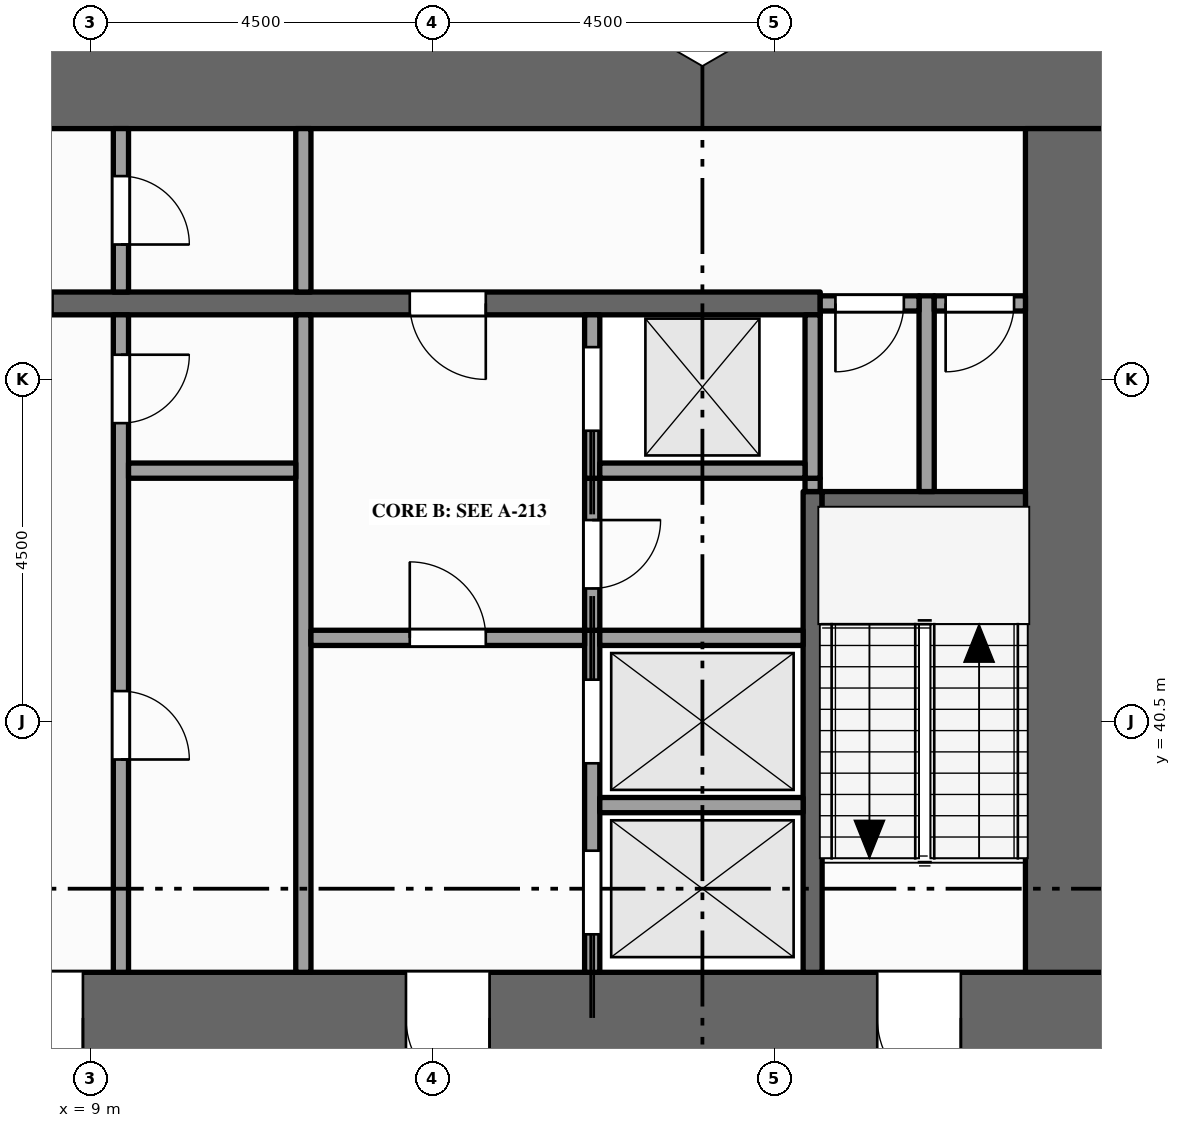
"""IFC4 building model, lengths in metres.
Left out: names, types, materials, properties, quantities, classifications, styles, units other than length and angle.
Written with IfcOpenShell. Run it as: python <this file> out.ifc"""

import sys

from ifc_helpers import new_model, si_unit, direction, frame, frame_2d, origin, place, context, subcontext, project, spatial, rectangle, extrude, element, fill, save


model = new_model("IFC4")
c1 = context("Model", 3, precision=1e-05, world=origin(), true_north=direction((0.0, 1.0)))
c2 = subcontext(c1, "Body", "Model", "MODEL_VIEW")
j1 = project(units=[si_unit("LENGTHUNIT", "METRE"), si_unit("PLANEANGLEUNIT", "RADIAN")], contexts=[c1])
p1 = place(None, origin())
s1 = spatial("IfcSite", under=j1, at=p1, CompositionType="ELEMENT")
p2 = place(p1, origin())
s2 = spatial("IfcBuilding", under=s1, at=p2, CompositionType="ELEMENT")
p3 = place(p2, frame((0.0, 0.0, 69.0)))
s3 = spatial("IfcBuildingStorey", under=s2, at=p3, CompositionType="ELEMENT", Elevation=69.0)
p4 = place(p3, frame((0.0, 36.6, -0.15), z_axis=(0.0, 0.0, 1.0), x_axis=(1.0, 0.0, 0.0)))
e1 = element("IfcWall", 1, at=p4, inside=s3, PredefinedType="SHEAR", context=c2, shape_type="SweptSolid", body=[
    extrude(rectangle(XDim=22.5, YDim=1.2, at=frame_2d((11.25, 0.0))), origin(), (0.0, 0.0, 1.0), 4.0),
])
p5 = place(p4, frame((7.1, 0.0, 0.15)))
e2 = element("IfcOpeningElement", 2, at=p5, cuts=e1, PredefinedType="OPENING", context=c2, shape_type="SweptSolid", body=[
    extrude(rectangle(XDim=1.8, YDim=2.1, at=frame_2d((0.9, 1.05))), frame((0.0, 0.61, 0.0), z_axis=(0.0, -1.0, 0.0), x_axis=(1.0, 0.0, 0.0)), (0.0, 0.0, 1.0), 1.22),
])
p6 = place(p4, frame((13.15, 0.0, 0.15)))
e3 = element("IfcOpeningElement", 3, at=p6, cuts=e1, PredefinedType="OPENING", context=c2, shape_type="SweptSolid", body=[
    extrude(rectangle(XDim=1.1, YDim=2.1, at=frame_2d((0.55, 1.05))), frame((0.0, 0.61, 0.0), z_axis=(0.0, -1.0, 0.0), x_axis=(1.0, 0.0, 0.0)), (0.0, 0.0, 1.0), 1.22),
])
p7 = place(p4, frame((2.15, 0.0, 0.15)))
e4 = element("IfcOpeningElement", 4, at=p7, cuts=e1, PredefinedType="OPENING", context=c2, shape_type="SweptSolid", body=[
    extrude(rectangle(XDim=1.1, YDim=2.1, at=frame_2d((0.55, 1.05))), frame((0.0, 0.61, 0.0), z_axis=(0.0, -1.0, 0.0), x_axis=(1.0, 0.0, 0.0)), (0.0, 0.0, 1.0), 1.22),
])
p8 = place(p4, frame((19.35, 0.0, 0.15)))
e5 = element("IfcOpeningElement", 5, at=p8, cuts=e1, PredefinedType="OPENING", context=c2, shape_type="SweptSolid", body=[
    extrude(rectangle(XDim=1.1, YDim=2.1, at=frame_2d((0.55, 1.05))), frame((0.0, 0.61, 0.0), z_axis=(0.0, -1.0, 0.0), x_axis=(1.0, 0.0, 0.0)), (0.0, 0.0, 1.0), 1.22),
])
p9 = place(p3, frame((0.0, 48.9, -0.15), z_axis=(0.0, 0.0, 1.0), x_axis=(1.0, 0.0, 0.0)))
e6 = element("IfcWall", 6, at=p9, inside=s3, PredefinedType="SHEAR", context=c2, shape_type="SweptSolid", body=[
    extrude(rectangle(XDim=22.5, YDim=1.2, at=frame_2d((11.25, 0.0))), origin(), (0.0, 0.0, 1.0), 4.0),
])
p10 = place(p3, frame((21.9, 37.2, -0.15), z_axis=(0.0, 0.0, 1.0), x_axis=(0.0, 1.0, 0.0)))
e7 = element("IfcWall", 7, at=p10, inside=s3, PredefinedType="SHEAR", context=c2, shape_type="SweptSolid", body=[
    extrude(rectangle(XDim=11.1, YDim=1.2, at=frame_2d((5.55, 0.0))), origin(), (0.0, 0.0, 1.0), 4.0),
])
p11 = place(p3, frame((9.4, 37.2, 0.0), z_axis=(0.0, 0.0, 1.0), x_axis=(0.0, 1.0, 0.0)))
e8 = element("IfcWall", 8, at=p11, inside=s3, PredefinedType="PARTITIONING", context=c2, shape_type="SweptSolid", body=[
    extrude(rectangle(XDim=8.65, YDim=0.2, at=frame_2d((4.325, 0.0))), origin(), (0.0, 0.0, 1.0), 3.85),
])
p12 = place(p11, frame((2.8, 0.0, 0.0)))
e9 = element("IfcOpeningElement", 9, at=p12, cuts=e8, PredefinedType="OPENING", context=c2, shape_type="SweptSolid", body=[
    extrude(rectangle(XDim=0.9, YDim=2.1, at=frame_2d((0.45, 1.05))), frame((0.0, 0.11, 0.0), z_axis=(0.0, -1.0, 0.0), x_axis=(1.0, 0.0, 0.0)), (0.0, 0.0, 1.0), 0.22),
])
p13 = place(p11, frame((7.225, 0.0, 0.0)))
e10 = element("IfcOpeningElement", 10, at=p13, cuts=e8, PredefinedType="OPENING", context=c2, shape_type="SweptSolid", body=[
    extrude(rectangle(XDim=0.9, YDim=2.1, at=frame_2d((0.45, 1.05))), frame((0.0, 0.11, 0.0), z_axis=(0.0, -1.0, 0.0), x_axis=(1.0, 0.0, 0.0)), (0.0, 0.0, 1.0), 0.22),
])
p14 = place(p3, frame((9.4, 46.15, 0.0), z_axis=(0.0, 0.0, 1.0), x_axis=(0.0, 1.0, 0.0)))
e11 = element("IfcWall", 11, at=p14, inside=s3, PredefinedType="PARTITIONING", context=c2, shape_type="SweptSolid", body=[
    extrude(rectangle(XDim=2.15, YDim=0.2, at=frame_2d((1.075, 0.0))), origin(), (0.0, 0.0, 1.0), 3.85),
])
p15 = place(p14, frame((0.625, 0.0, 0.0)))
e12 = element("IfcOpeningElement", 12, at=p15, cuts=e11, PredefinedType="OPENING", context=c2, shape_type="SweptSolid", body=[
    extrude(rectangle(XDim=0.9, YDim=2.1, at=frame_2d((0.45, 1.05))), frame((0.0, 0.11, 0.0), z_axis=(0.0, -1.0, 0.0), x_axis=(1.0, 0.0, 0.0)), (0.0, 0.0, 1.0), 0.22),
])
p16 = place(p3, frame((11.8, 37.2, 0.0), z_axis=(0.0, 0.0, 1.0), x_axis=(0.0, 1.0, 0.0)))
e13 = element("IfcWall", 13, at=p16, inside=s3, PredefinedType="PARTITIONING", context=c2, shape_type="SweptSolid", body=[
    extrude(rectangle(XDim=8.65, YDim=0.2, at=frame_2d((4.325, 0.0))), origin(), (0.0, 0.0, 1.0), 3.85),
])
p17 = place(p3, frame((11.8, 46.15, 0.0), z_axis=(0.0, 0.0, 1.0), x_axis=(0.0, 1.0, 0.0)))
e14 = element("IfcWall", 14, at=p17, inside=s3, PredefinedType="PARTITIONING", context=c2, shape_type="SweptSolid", body=[
    extrude(rectangle(XDim=2.15, YDim=0.2, at=frame_2d((1.075, 0.0))), origin(), (0.0, 0.0, 1.0), 3.85),
])
p18 = place(p3, frame((15.6, 37.2, 0.0), z_axis=(0.0, 0.0, 1.0), x_axis=(0.0, 1.0, 0.0)))
e15 = element("IfcWall", 15, at=p18, inside=s3, PredefinedType="SOLIDWALL", context=c2, shape_type="SweptSolid", body=[
    extrude(rectangle(XDim=4.5, YDim=0.2, at=frame_2d((2.25, 0.0))), origin(), (0.0, 0.0, 1.0), 3.85),
])
p19 = place(p18, frame((0.5, 0.0, 0.012)))
e16 = element("IfcOpeningElement", 16, at=p19, cuts=e15, PredefinedType="OPENING", context=c2, shape_type="SweptSolid", body=[
    extrude(rectangle(XDim=1.1, YDim=2.1, at=frame_2d((0.55, 1.05))), frame((0.0, 0.11, 0.0), z_axis=(0.0, -1.0, 0.0), x_axis=(1.0, 0.0, 0.0)), (0.0, 0.0, 1.0), 0.22),
])
p20 = place(p18, frame((2.75, 0.0, 0.012)))
e17 = element("IfcOpeningElement", 17, at=p20, cuts=e15, PredefinedType="OPENING", context=c2, shape_type="SweptSolid", body=[
    extrude(rectangle(XDim=1.1, YDim=2.1, at=frame_2d((0.55, 1.05))), frame((0.0, 0.11, 0.0), z_axis=(0.0, -1.0, 0.0), x_axis=(1.0, 0.0, 0.0)), (0.0, 0.0, 1.0), 0.22),
])
p21 = place(p3, frame((15.6, 41.7, 0.0), z_axis=(0.0, 0.0, 1.0), x_axis=(0.0, 1.0, 0.0)))
e18 = element("IfcWall", 18, at=p21, inside=s3, PredefinedType="PARTITIONING", context=c2, shape_type="SweptSolid", body=[
    extrude(rectangle(XDim=2.0, YDim=0.2, at=frame_2d((1.0, 0.0))), origin(), (0.0, 0.0, 1.0), 3.85),
])
p22 = place(p21, frame((0.55, 0.0, 0.0)))
e19 = element("IfcOpeningElement", 19, at=p22, cuts=e18, PredefinedType="OPENING", context=c2, shape_type="SweptSolid", body=[
    extrude(rectangle(XDim=0.9, YDim=2.1, at=frame_2d((0.45, 1.05))), frame((0.0, 0.11, 0.0), z_axis=(0.0, -1.0, 0.0), x_axis=(1.0, 0.0, 0.0)), (0.0, 0.0, 1.0), 0.22),
])
p23 = place(p3, frame((15.6, 43.7, 0.0), z_axis=(0.0, 0.0, 1.0), x_axis=(0.0, 1.0, 0.0)))
e20 = element("IfcWall", 20, at=p23, inside=s3, PredefinedType="SOLIDWALL", context=c2, shape_type="SweptSolid", body=[
    extrude(rectangle(XDim=2.15, YDim=0.2, at=frame_2d((1.075, 0.0))), origin(), (0.0, 0.0, 1.0), 3.85),
])
p24 = place(p23, frame((0.625, 0.0, 0.012)))
e21 = element("IfcOpeningElement", 21, at=p24, cuts=e20, PredefinedType="OPENING", context=c2, shape_type="SweptSolid", body=[
    extrude(rectangle(XDim=1.1, YDim=2.1, at=frame_2d((0.55, 1.05))), frame((0.0, 0.11, 0.0), z_axis=(0.0, -1.0, 0.0), x_axis=(1.0, 0.0, 0.0)), (0.0, 0.0, 1.0), 0.22),
])
p25 = place(p3, frame((18.5, 37.2, 0.0), z_axis=(0.0, 0.0, 1.0), x_axis=(0.0, 1.0, 0.0)))
e22 = element("IfcWall", 22, at=p25, inside=s3, PredefinedType="SHEAR", context=c2, shape_type="SweptSolid", body=[
    extrude(rectangle(XDim=6.325, YDim=0.25, at=frame_2d((3.163, 0.0))), origin(), (0.0, 0.0, 1.0), 3.85),
])
p26 = place(p3, frame((18.5, 43.525, 0.0), z_axis=(0.0, 0.0, 1.0), x_axis=(0.0, 1.0, 0.0)))
e23 = element("IfcWall", 23, at=p26, inside=s3, PredefinedType="PARTITIONING", context=c2, shape_type="SweptSolid", body=[
    extrude(rectangle(XDim=0.175, YDim=0.2, at=frame_2d((0.087, 0.0))), origin(), (0.0, 0.0, 1.0), 3.85),
])
p27 = place(p3, frame((18.5, 43.7, 0.0), z_axis=(0.0, 0.0, 1.0), x_axis=(0.0, 1.0, 0.0)))
e24 = element("IfcWall", 24, at=p27, inside=s3, PredefinedType="SOLIDWALL", context=c2, shape_type="SweptSolid", body=[
    extrude(rectangle(XDim=2.15, YDim=0.2, at=frame_2d((1.075, 0.0))), origin(), (0.0, 0.0, 1.0), 3.85),
])
p28 = place(p3, frame((20.0, 43.525, 0.0), z_axis=(0.0, 0.0, 1.0), x_axis=(0.0, 1.0, 0.0)))
e25 = element("IfcWall", 25, at=p28, inside=s3, PredefinedType="PARTITIONING", context=c2, shape_type="SweptSolid", body=[
    extrude(rectangle(XDim=2.575, YDim=0.2, at=frame_2d((1.288, 0.0))), origin(), (0.0, 0.0, 1.0), 3.85),
])
p29 = place(p3, frame((15.7, 39.4, 0.0), z_axis=(0.0, 0.0, 1.0), x_axis=(1.0, 0.0, 0.0)))
e26 = element("IfcWall", 26, at=p29, inside=s3, PredefinedType="SOLIDWALL", context=c2, shape_type="SweptSolid", body=[
    extrude(rectangle(XDim=2.675, YDim=0.2, at=frame_2d((1.337, 0.0))), origin(), (0.0, 0.0, 1.0), 3.85),
])
p30 = place(p3, frame((11.9, 41.6, 0.0), z_axis=(0.0, 0.0, 1.0), x_axis=(1.0, 0.0, 0.0)))
e27 = element("IfcWall", 27, at=p30, inside=s3, PredefinedType="PARTITIONING", context=c2, shape_type="SweptSolid", body=[
    extrude(rectangle(XDim=3.6, YDim=0.2, at=frame_2d((1.8, 0.0))), origin(), (0.0, 0.0, 1.0), 3.85),
])
p31 = place(p30, frame((1.3, 0.0, 0.0)))
e28 = element("IfcOpeningElement", 28, at=p31, cuts=e27, PredefinedType="OPENING", context=c2, shape_type="SweptSolid", body=[
    extrude(rectangle(XDim=1.0, YDim=2.1, at=frame_2d((0.5, 1.05))), frame((0.0, 0.11, 0.0), z_axis=(0.0, -1.0, 0.0), x_axis=(1.0, 0.0, 0.0)), (0.0, 0.0, 1.0), 0.22),
])
p32 = place(p3, frame((15.7, 41.6, 0.0), z_axis=(0.0, 0.0, 1.0), x_axis=(1.0, 0.0, 0.0)))
e29 = element("IfcWall", 29, at=p32, inside=s3, PredefinedType="SOLIDWALL", context=c2, shape_type="SweptSolid", body=[
    extrude(rectangle(XDim=2.675, YDim=0.2, at=frame_2d((1.337, 0.0))), origin(), (0.0, 0.0, 1.0), 3.85),
])
p33 = place(p3, frame((18.625, 43.4, 0.0), z_axis=(0.0, 0.0, 1.0), x_axis=(1.0, 0.0, 0.0)))
e30 = element("IfcWall", 30, at=p33, inside=s3, PredefinedType="SHEAR", context=c2, shape_type="SweptSolid", body=[
    extrude(rectangle(XDim=2.675, YDim=0.25, at=frame_2d((1.337, 0.0))), origin(), (0.0, 0.0, 1.0), 3.85),
])
p34 = place(p3, frame((9.5, 43.8, 0.0), z_axis=(0.0, 0.0, 1.0), x_axis=(1.0, 0.0, 0.0)))
e31 = element("IfcWall", 31, at=p34, inside=s3, PredefinedType="PARTITIONING", context=c2, shape_type="SweptSolid", body=[
    extrude(rectangle(XDim=2.2, YDim=0.2, at=frame_2d((1.1, 0.0))), origin(), (0.0, 0.0, 1.0), 3.85),
])
p35 = place(p3, frame((15.7, 43.8, 0.0), z_axis=(0.0, 0.0, 1.0), x_axis=(1.0, 0.0, 0.0)))
e32 = element("IfcWall", 32, at=p35, inside=s3, PredefinedType="SOLIDWALL", context=c2, shape_type="SweptSolid", body=[
    extrude(rectangle(XDim=2.7, YDim=0.2, at=frame_2d((1.35, 0.0))), origin(), (0.0, 0.0, 1.0), 3.85),
])
p36 = place(p3, frame((4.1, 46.0, 0.0), z_axis=(0.0, 0.0, 1.0), x_axis=(1.0, 0.0, 0.0)))
e33 = element("IfcWall", 33, at=p36, inside=s3, PredefinedType="SHEAR", context=c2, shape_type="SweptSolid", body=[
    extrude(rectangle(XDim=14.5, YDim=0.3, at=frame_2d((7.25, 0.0))), origin(), (0.0, 0.0, 1.0), 3.85),
])
p37 = place(p36, frame((3.4, 0.0, 0.0)))
e34 = element("IfcOpeningElement", 34, at=p37, cuts=e33, PredefinedType="OPENING", context=c2, shape_type="SweptSolid", body=[
    extrude(rectangle(XDim=1.0, YDim=2.1, at=frame_2d((0.5, 1.05))), frame((0.0, 0.16, 0.0), z_axis=(0.0, -1.0, 0.0), x_axis=(1.0, 0.0, 0.0)), (0.0, 0.0, 1.0), 0.32),
])
p38 = place(p36, frame((9.1, 0.0, 0.0)))
e35 = element("IfcOpeningElement", 35, at=p38, cuts=e33, PredefinedType="OPENING", context=c2, shape_type="SweptSolid", body=[
    extrude(rectangle(XDim=1.0, YDim=2.1, at=frame_2d((0.5, 1.05))), frame((0.0, 0.16, 0.0), z_axis=(0.0, -1.0, 0.0), x_axis=(1.0, 0.0, 0.0)), (0.0, 0.0, 1.0), 0.32),
])
p39 = place(p3, frame((18.6, 46.0, 0.0), z_axis=(0.0, 0.0, 1.0), x_axis=(1.0, 0.0, 0.0)))
e36 = element("IfcWall", 36, at=p39, inside=s3, PredefinedType="PARTITIONING", context=c2, shape_type="SweptSolid", body=[
    extrude(rectangle(XDim=1.3, YDim=0.2, at=frame_2d((0.65, 0.0))), origin(), (0.0, 0.0, 1.0), 3.85),
])
p40 = place(p39, frame((0.2, 0.0, 0.0)))
e37 = element("IfcOpeningElement", 37, at=p40, cuts=e36, PredefinedType="OPENING", context=c2, shape_type="SweptSolid", body=[
    extrude(rectangle(XDim=0.9, YDim=2.1, at=frame_2d((0.45, 1.05))), frame((0.0, 0.11, 0.0), z_axis=(0.0, -1.0, 0.0), x_axis=(1.0, 0.0, 0.0)), (0.0, 0.0, 1.0), 0.22),
])
p41 = place(p3, frame((20.1, 46.0, 0.0), z_axis=(0.0, 0.0, 1.0), x_axis=(1.0, 0.0, 0.0)))
e38 = element("IfcWall", 38, at=p41, inside=s3, PredefinedType="PARTITIONING", context=c2, shape_type="SweptSolid", body=[
    extrude(rectangle(XDim=1.2, YDim=0.2, at=frame_2d((0.6, 0.0))), origin(), (0.0, 0.0, 1.0), 3.85),
])
p42 = place(p41, frame((0.15, 0.0, 0.0)))
e39 = element("IfcOpeningElement", 39, at=p42, cuts=e38, PredefinedType="OPENING", context=c2, shape_type="SweptSolid", body=[
    extrude(rectangle(XDim=0.9, YDim=2.1, at=frame_2d((0.45, 1.05))), frame((0.0, 0.11, 0.0), z_axis=(0.0, -1.0, 0.0), x_axis=(1.0, 0.0, 0.0)), (0.0, 0.0, 1.0), 0.22),
])
p43 = place(p19, origin())
e40 = element("IfcDoor", 40, at=p43, inside=s3, OperationType="SLIDING_TO_LEFT", PredefinedType="DOOR", context=c2, shape_type="SweptSolid", body=[
    extrude(rectangle(XDim=1.1, YDim=2.1, at=frame_2d((0.55, 1.05))), frame((0.0, 0.025, 0.0), z_axis=(0.0, -1.0, 0.0), x_axis=(1.0, 0.0, 0.0)), (0.0, 0.0, 1.0), 0.05),
])
fill(e16, e40)
p44 = place(p20, origin())
e41 = element("IfcDoor", 41, at=p44, inside=s3, OperationType="SLIDING_TO_RIGHT", PredefinedType="DOOR", context=c2, shape_type="SweptSolid", body=[
    extrude(rectangle(XDim=1.1, YDim=2.1, at=frame_2d((0.55, 1.05))), frame((0.0, 0.025, 0.0), z_axis=(0.0, -1.0, 0.0), x_axis=(1.0, 0.0, 0.0)), (0.0, 0.0, 1.0), 0.05),
])
fill(e17, e41)
p45 = place(p24, origin())
e42 = element("IfcDoor", 42, at=p45, inside=s3, OperationType="SLIDING_TO_LEFT", PredefinedType="DOOR", context=c2, shape_type="SweptSolid", body=[
    extrude(rectangle(XDim=1.1, YDim=2.1, at=frame_2d((0.55, 1.05))), frame((0.0, 0.025, 0.0), z_axis=(0.0, -1.0, 0.0), x_axis=(1.0, 0.0, 0.0)), (0.0, 0.0, 1.0), 0.05),
])
fill(e21, e42)
p46 = place(p5, origin())
e43 = element("IfcDoor", 43, at=p46, inside=s3, OperationType="DOUBLE_DOOR_SINGLE_SWING", PredefinedType="DOOR", context=c2, shape_type="SweptSolid", body=[
    extrude(rectangle(XDim=1.8, YDim=2.1, at=frame_2d((0.9, 1.05))), frame((0.0, 0.025, 0.0), z_axis=(0.0, -1.0, 0.0), x_axis=(1.0, 0.0, 0.0)), (0.0, 0.0, 1.0), 0.05),
])
fill(e2, e43)
p47 = place(p6, origin())
e44 = element("IfcDoor", 44, at=p47, inside=s3, OperationType="SINGLE_SWING_RIGHT", PredefinedType="DOOR", context=c2, shape_type="SweptSolid", body=[
    extrude(rectangle(XDim=1.1, YDim=2.1, at=frame_2d((0.55, 1.05))), frame((0.0, 0.025, 0.0), z_axis=(0.0, -1.0, 0.0), x_axis=(1.0, 0.0, 0.0)), (0.0, 0.0, 1.0), 0.05),
])
fill(e3, e44)
p48 = place(p31, origin())
e45 = element("IfcDoor", 45, at=p48, inside=s3, OperationType="SINGLE_SWING_LEFT", PredefinedType="DOOR", context=c2, shape_type="SweptSolid", body=[
    extrude(rectangle(XDim=1.0, YDim=2.1, at=frame_2d((0.5, 1.05))), frame((0.0, 0.025, 0.0), z_axis=(0.0, -1.0, 0.0), x_axis=(1.0, 0.0, 0.0)), (0.0, 0.0, 1.0), 0.05),
])
fill(e28, e45)
p49 = place(p38, origin())
e46 = element("IfcDoor", 46, at=p49, inside=s3, OperationType="SINGLE_SWING_RIGHT", PredefinedType="DOOR", context=c2, shape_type="SweptSolid", body=[
    extrude(rectangle(XDim=1.0, YDim=2.1, at=frame_2d((0.5, 1.05))), frame((0.0, 0.025, 0.0), z_axis=(0.0, -1.0, 0.0), x_axis=(1.0, 0.0, 0.0)), (0.0, 0.0, 1.0), 0.05),
])
fill(e35, e46)
p50 = place(p15, origin())
e47 = element("IfcDoor", 47, at=p50, inside=s3, OperationType="SINGLE_SWING_LEFT", PredefinedType="DOOR", context=c2, shape_type="SweptSolid", body=[
    extrude(rectangle(XDim=0.9, YDim=2.1, at=frame_2d((0.45, 1.05))), frame((0.0, 0.025, 0.0), z_axis=(0.0, -1.0, 0.0), x_axis=(1.0, 0.0, 0.0)), (0.0, 0.0, 1.0), 0.05),
])
fill(e12, e47)
p51 = place(p8, origin())
e48 = element("IfcDoor", 48, at=p51, inside=s3, OperationType="SINGLE_SWING_RIGHT", PredefinedType="DOOR", context=c2, shape_type="SweptSolid", body=[
    extrude(rectangle(XDim=1.1, YDim=2.1, at=frame_2d((0.55, 1.05))), frame((0.0, 0.025, 0.0), z_axis=(0.0, -1.0, 0.0), x_axis=(1.0, 0.0, 0.0)), (0.0, 0.0, 1.0), 0.05),
])
fill(e5, e48)
p52 = place(p40, origin())
e49 = element("IfcDoor", 49, at=p52, inside=s3, OperationType="SINGLE_SWING_LEFT", PredefinedType="DOOR", context=c2, shape_type="SweptSolid", body=[
    extrude(rectangle(XDim=0.9, YDim=2.1, at=frame_2d((0.45, 1.05))), frame((0.0, 0.025, 0.0), z_axis=(0.0, -1.0, 0.0), x_axis=(1.0, 0.0, 0.0)), (0.0, 0.0, 1.0), 0.05),
])
fill(e37, e49)
p53 = place(p42, origin())
e50 = element("IfcDoor", 50, at=p53, inside=s3, OperationType="SINGLE_SWING_LEFT", PredefinedType="DOOR", context=c2, shape_type="SweptSolid", body=[
    extrude(rectangle(XDim=0.9, YDim=2.1, at=frame_2d((0.45, 1.05))), frame((0.0, 0.025, 0.0), z_axis=(0.0, -1.0, 0.0), x_axis=(1.0, 0.0, 0.0)), (0.0, 0.0, 1.0), 0.05),
])
fill(e39, e50)
p54 = place(p12, origin())
e51 = element("IfcDoor", 51, at=p54, inside=s3, OperationType="SINGLE_SWING_LEFT", PredefinedType="DOOR", context=c2, shape_type="SweptSolid", body=[
    extrude(rectangle(XDim=0.9, YDim=2.1, at=frame_2d((0.45, 1.05))), frame((0.0, 0.025, 0.0), z_axis=(0.0, -1.0, 0.0), x_axis=(1.0, 0.0, 0.0)), (0.0, 0.0, 1.0), 0.05),
])
fill(e9, e51)
p55 = place(p13, origin())
e52 = element("IfcDoor", 52, at=p55, inside=s3, OperationType="SINGLE_SWING_RIGHT", PredefinedType="DOOR", context=c2, shape_type="SweptSolid", body=[
    extrude(rectangle(XDim=0.9, YDim=2.1, at=frame_2d((0.45, 1.05))), frame((0.0, 0.025, 0.0), z_axis=(0.0, -1.0, 0.0), x_axis=(1.0, 0.0, 0.0)), (0.0, 0.0, 1.0), 0.05),
])
fill(e10, e52)
p56 = place(p22, origin())
e53 = element("IfcDoor", 53, at=p56, inside=s3, OperationType="SINGLE_SWING_RIGHT", PredefinedType="DOOR", context=c2, shape_type="SweptSolid", body=[
    extrude(rectangle(XDim=0.9, YDim=2.1, at=frame_2d((0.45, 1.05))), frame((0.0, 0.025, 0.0), z_axis=(0.0, -1.0, 0.0), x_axis=(1.0, 0.0, 0.0)), (0.0, 0.0, 1.0), 0.05),
])
fill(e19, e53)
save(model, sys.argv[1])
